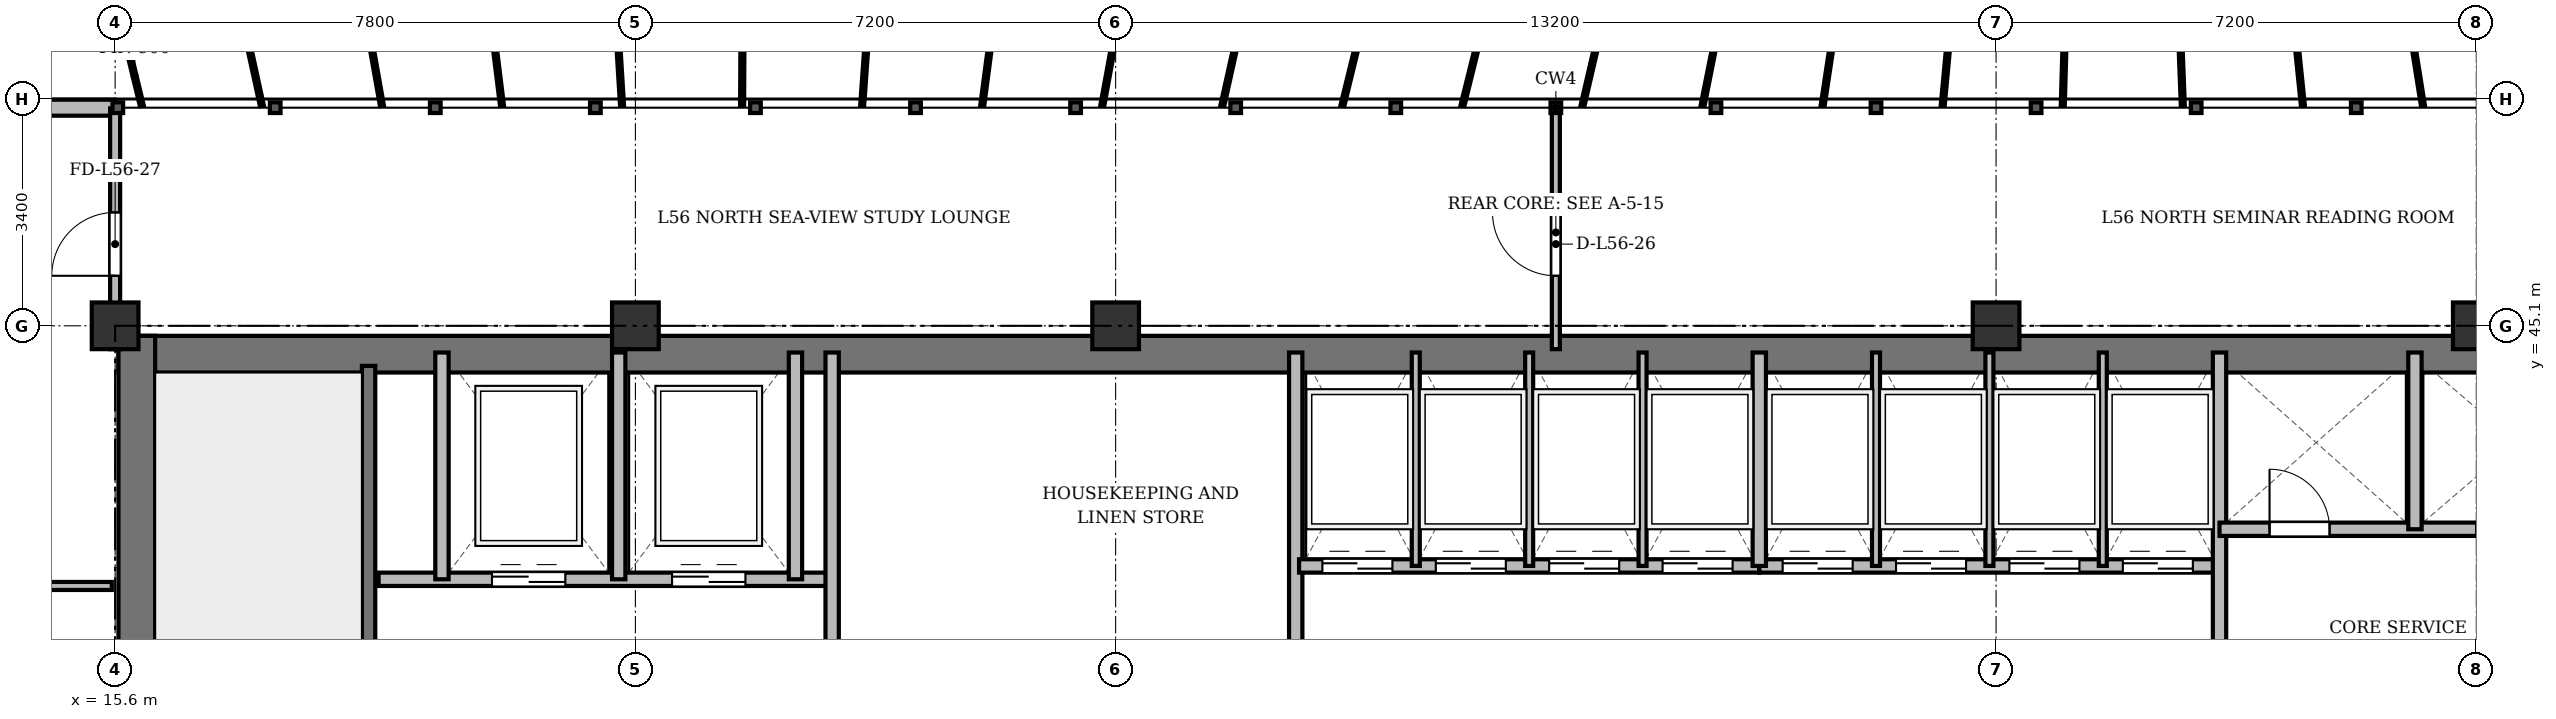
"""IFC4 building model, lengths in metres.
Left out: names, types, materials, properties, quantities, classifications, styles, units other than length and angle.
Written with IfcOpenShell. Run it as: python <this file> out.ifc"""

import sys

from ifc_helpers import new_model, si_unit, direction, frame, frame_2d, origin, origin_2d, place, context, subcontext, project, spatial, rectangle, extrude, source, transform, mapped, element, fill, save


model = new_model("IFC4")
c1 = context("Model", 3, precision=1e-05, world=origin(), true_north=direction((0.0, 1.0)))
c2 = subcontext(c1, "Body", "Model", "MODEL_VIEW")
j1 = project(units=[si_unit("LENGTHUNIT", "METRE"), si_unit("PLANEANGLEUNIT", "RADIAN")], contexts=[c1])
p1 = place(None, origin())
s1 = spatial("IfcSite", under=j1, at=p1, CompositionType="ELEMENT")
p2 = place(p1, origin())
s2 = spatial("IfcBuilding", under=s1, at=p2, CompositionType="ELEMENT")
p3 = place(p2, frame((0.0, 0.0, 215.7)))
s3 = spatial("IfcBuildingStorey", under=s2, at=p3, CompositionType="ELEMENT", Elevation=215.7)
m1 = source(origin(), c2, "Body", "SweptSolid", [
    extrude(rectangle(XDim=0.7, YDim=0.7, at=origin_2d()), origin(), (0.0, 0.0, 1.0), 3.6),
])
for number, where, z_axis, x_axis in (
    (1, (15.6, 45.1, 0.0), (0.0, 0.0, 1.0), (1.0, 0.0, 0.0)),
    (2, (23.4, 45.1, 0.0), (0.0, 0.0, 1.0), (1.0, 0.0, 0.0)),
    (3, (30.6, 45.1, 0.0), (0.0, 0.0, 1.0), (1.0, 0.0, 0.0)),
    (4, (43.8, 45.1, 0.0), (0.0, 0.0, 1.0), (1.0, 0.0, 0.0)),
    (5, (51.0, 45.1, 0.0), (0.0, 0.0, 1.0), (1.0, 0.0, 0.0)),
):
    element("IfcColumn", number, at=place(p3, frame(where, z_axis=z_axis, x_axis=x_axis)), inside=s3, PredefinedType="COLUMN", context=c2, shape_type="MappedRepresentation", body=[
        mapped(m1, transform((0.0, 0.0, 0.0), x_axis=(1.0, 0.0, 0.0), y_axis=(0.0, 1.0, 0.0), z_axis=(0.0, 0.0, 1.0), scale=1.0)),
    ])
p4 = place(p3, frame((11.1, 48.37, 0.0), z_axis=(0.0, 0.0, 1.0), x_axis=(1.0, 0.0, 0.0)))
e6 = element("IfcWall", 6, at=p4, inside=s3, PredefinedType="SOLIDWALL", context=c2, shape_type="SweptSolid", body=[
    extrude(rectangle(XDim=4.5, YDim=0.24, at=frame_2d((2.25, 0.0))), origin(), (0.0, 0.0, 1.0), 3.36),
])
p5 = place(p4, frame((1.65, 0.0, 0.9)))
e7 = element("IfcOpeningElement", 7, at=p5, cuts=e6, PredefinedType="OPENING", context=c2, shape_type="SweptSolid", body=[
    extrude(rectangle(XDim=1.2, YDim=1.65, at=frame_2d((0.6, 0.825))), frame((0.0, 0.13, 0.0), z_axis=(0.0, -1.0, 0.0), x_axis=(1.0, 0.0, 0.0)), (0.0, 0.0, 1.0), 0.26),
])
p6 = place(p3, frame((15.65, 44.675, 0.0), z_axis=(0.0, 0.0, 1.0), x_axis=(1.0, 0.0, 0.0)))
e8 = element("IfcWall", 8, at=p6, inside=s3, PredefinedType="SHEAR", context=c2, shape_type="SweptSolid", body=[
    extrude(rectangle(XDim=43.1, YDim=0.55, at=frame_2d((21.55, 0.0))), origin(), (0.0, 0.0, 1.0), 3.36),
])
p7 = place(p3, frame((15.925, 33.4, 0.0), z_axis=(0.0, 0.0, 1.0), x_axis=(0.0, 1.0, 0.0)))
e9 = element("IfcWall", 9, at=p7, inside=s3, PredefinedType="SHEAR", context=c2, shape_type="SweptSolid", body=[
    extrude(rectangle(XDim=11.55, YDim=0.55, at=frame_2d((5.775, 0.0))), origin(), (0.0, 0.0, 1.0), 3.36),
])
p8 = place(p3, frame((19.4, 33.4, 0.0), z_axis=(0.0, 0.0, 1.0), x_axis=(0.0, 1.0, 0.0)))
e10 = element("IfcWall", 10, at=p8, inside=s3, PredefinedType="SHEAR", context=c2, shape_type="SweptSolid", body=[
    extrude(rectangle(XDim=11.1, YDim=0.2, at=frame_2d((5.55, 0.0))), origin(), (0.0, 0.0, 1.0), 3.36),
])
p9 = place(p8, frame((0.85, 0.0, 0.0)))
e11 = element("IfcOpeningElement", 11, at=p9, cuts=e10, PredefinedType="OPENING", context=c2, shape_type="SweptSolid", body=[
    extrude(rectangle(XDim=1.1, YDim=2.15, at=frame_2d((0.55, 1.075))), frame((0.0, 0.11, 0.0), z_axis=(0.0, -1.0, 0.0), x_axis=(1.0, 0.0, 0.0)), (0.0, 0.0, 1.0), 0.22),
])
p10 = place(p3, frame((19.55, 41.3, 0.0), z_axis=(0.0, 0.0, 1.0), x_axis=(1.0, 0.0, 0.0)))
e12 = element("IfcWall", 12, at=p10, inside=s3, PredefinedType="SOLIDWALL", context=c2, shape_type="SweptSolid", body=[
    extrude(rectangle(XDim=6.75, YDim=0.2, at=frame_2d((3.375, 0.0))), origin(), (0.0, 0.0, 1.0), 3.36),
])
p11 = place(p10, frame((1.7, 0.0, 0.0)))
e13 = element("IfcOpeningElement", 13, at=p11, cuts=e12, PredefinedType="OPENING", context=c2, shape_type="SweptSolid", body=[
    extrude(rectangle(XDim=1.1, YDim=2.15, at=frame_2d((0.55, 1.075))), frame((0.0, 0.11, 0.0), z_axis=(0.0, -1.0, 0.0), x_axis=(1.0, 0.0, 0.0)), (0.0, 0.0, 1.0), 0.22),
])
p12 = place(p10, frame((4.4, 0.0, 0.0)))
e14 = element("IfcOpeningElement", 14, at=p12, cuts=e12, PredefinedType="OPENING", context=c2, shape_type="SweptSolid", body=[
    extrude(rectangle(XDim=1.1, YDim=2.15, at=frame_2d((0.55, 1.075))), frame((0.0, 0.11, 0.0), z_axis=(0.0, -1.0, 0.0), x_axis=(1.0, 0.0, 0.0)), (0.0, 0.0, 1.0), 0.22),
])
for number, where, z_axis, x_axis in (
    (15, (20.5, 41.3, 0.0), (0.0, 0.0, 1.0), (0.0, 1.0, 0.0)),
    (16, (23.15, 41.3, 0.0), (0.0, 0.0, 1.0), (0.0, 1.0, 0.0)),
    (17, (25.8, 41.3, 0.0), (0.0, 0.0, 1.0), (0.0, 1.0, 0.0)),
):
    element("IfcWall", number, at=place(p3, frame(where, z_axis=z_axis, x_axis=x_axis)), inside=s3, PredefinedType="SOLIDWALL", context=c2, shape_type="SweptSolid", body=[
        extrude(rectangle(XDim=3.4, YDim=0.2, at=frame_2d((1.7, 0.0))), origin(), (0.0, 0.0, 1.0), 3.36),
    ])
for number, where, z_axis, x_axis in (
    (18, (26.35, 33.4, 0.0), (0.0, 0.0, 1.0), (0.0, 1.0, 0.0)),
    (19, (33.3, 33.4, 0.0), (0.0, 0.0, 1.0), (0.0, 1.0, 0.0)),
):
    element("IfcWall", number, at=place(p3, frame(where, z_axis=z_axis, x_axis=x_axis)), inside=s3, PredefinedType="SOLIDWALL", context=c2, shape_type="SweptSolid", body=[
        extrude(rectangle(XDim=11.3, YDim=0.2, at=frame_2d((5.65, 0.0))), origin(), (0.0, 0.0, 1.0), 2.91),
    ])
p13 = place(p3, frame((33.35, 41.5, 0.0), z_axis=(0.0, 0.0, 1.0), x_axis=(1.0, 0.0, 0.0)))
e20 = element("IfcWall", 20, at=p13, inside=s3, PredefinedType="SOLIDWALL", context=c2, shape_type="SweptSolid", body=[
    extrude(rectangle(XDim=6.9, YDim=0.2, at=frame_2d((3.45, 0.0))), origin(), (0.0, 0.0, 1.0), 3.36),
])
p14 = place(p13, frame((0.35, 0.0, 0.0)))
e21 = element("IfcOpeningElement", 21, at=p14, cuts=e20, PredefinedType="OPENING", context=c2, shape_type="SweptSolid", body=[
    extrude(rectangle(XDim=1.05, YDim=2.15, at=frame_2d((0.525, 1.075))), frame((0.0, 0.11, 0.0), z_axis=(0.0, -1.0, 0.0), x_axis=(1.0, 0.0, 0.0)), (0.0, 0.0, 1.0), 0.22),
])
p15 = place(p13, frame((2.05, 0.0, 0.0)))
e22 = element("IfcOpeningElement", 22, at=p15, cuts=e20, PredefinedType="OPENING", context=c2, shape_type="SweptSolid", body=[
    extrude(rectangle(XDim=1.05, YDim=2.15, at=frame_2d((0.525, 1.075))), frame((0.0, 0.11, 0.0), z_axis=(0.0, -1.0, 0.0), x_axis=(1.0, 0.0, 0.0)), (0.0, 0.0, 1.0), 0.22),
])
p16 = place(p13, frame((3.75, 0.0, 0.0)))
e23 = element("IfcOpeningElement", 23, at=p16, cuts=e20, PredefinedType="OPENING", context=c2, shape_type="SweptSolid", body=[
    extrude(rectangle(XDim=1.05, YDim=2.15, at=frame_2d((0.525, 1.075))), frame((0.0, 0.11, 0.0), z_axis=(0.0, -1.0, 0.0), x_axis=(1.0, 0.0, 0.0)), (0.0, 0.0, 1.0), 0.22),
])
p17 = place(p13, frame((5.45, 0.0, 0.0)))
e24 = element("IfcOpeningElement", 24, at=p17, cuts=e20, PredefinedType="OPENING", context=c2, shape_type="SweptSolid", body=[
    extrude(rectangle(XDim=1.05, YDim=2.15, at=frame_2d((0.525, 1.075))), frame((0.0, 0.11, 0.0), z_axis=(0.0, -1.0, 0.0), x_axis=(1.0, 0.0, 0.0)), (0.0, 0.0, 1.0), 0.22),
])
for number, where, z_axis, x_axis in (
    (25, (35.1, 41.5, 0.0), (0.0, 0.0, 1.0), (0.0, 1.0, 0.0)),
    (26, (36.8, 41.5, 0.0), (0.0, 0.0, 1.0), (0.0, 1.0, 0.0)),
    (27, (38.5, 41.5, 0.0), (0.0, 0.0, 1.0), (0.0, 1.0, 0.0)),
):
    element("IfcWall", number, at=place(p3, frame(where, z_axis=z_axis, x_axis=x_axis)), inside=s3, PredefinedType="PARTITIONING", context=c2, shape_type="SweptSolid", body=[
        extrude(rectangle(XDim=3.2, YDim=0.12, at=frame_2d((1.6, 0.0))), origin(), (0.0, 0.0, 1.0), 3.36),
    ])
p18 = place(p3, frame((40.25, 41.5, 0.0), z_axis=(0.0, 0.0, 1.0), x_axis=(1.0, 0.0, 0.0)))
e28 = element("IfcWall", 28, at=p18, inside=s3, PredefinedType="SOLIDWALL", context=c2, shape_type="SweptSolid", body=[
    extrude(rectangle(XDim=6.9, YDim=0.2, at=frame_2d((3.45, 0.0))), origin(), (0.0, 0.0, 1.0), 3.36),
])
p19 = place(p18, frame((0.35, 0.0, 0.0)))
e29 = element("IfcOpeningElement", 29, at=p19, cuts=e28, PredefinedType="OPENING", context=c2, shape_type="SweptSolid", body=[
    extrude(rectangle(XDim=1.05, YDim=2.15, at=frame_2d((0.525, 1.075))), frame((0.0, 0.11, 0.0), z_axis=(0.0, -1.0, 0.0), x_axis=(1.0, 0.0, 0.0)), (0.0, 0.0, 1.0), 0.22),
])
p20 = place(p18, frame((2.05, 0.0, 0.0)))
e30 = element("IfcOpeningElement", 30, at=p20, cuts=e28, PredefinedType="OPENING", context=c2, shape_type="SweptSolid", body=[
    extrude(rectangle(XDim=1.05, YDim=2.15, at=frame_2d((0.525, 1.075))), frame((0.0, 0.11, 0.0), z_axis=(0.0, -1.0, 0.0), x_axis=(1.0, 0.0, 0.0)), (0.0, 0.0, 1.0), 0.22),
])
p21 = place(p18, frame((3.75, 0.0, 0.0)))
e31 = element("IfcOpeningElement", 31, at=p21, cuts=e28, PredefinedType="OPENING", context=c2, shape_type="SweptSolid", body=[
    extrude(rectangle(XDim=1.05, YDim=2.15, at=frame_2d((0.525, 1.075))), frame((0.0, 0.11, 0.0), z_axis=(0.0, -1.0, 0.0), x_axis=(1.0, 0.0, 0.0)), (0.0, 0.0, 1.0), 0.22),
])
p22 = place(p18, frame((5.45, 0.0, 0.0)))
e32 = element("IfcOpeningElement", 32, at=p22, cuts=e28, PredefinedType="OPENING", context=c2, shape_type="SweptSolid", body=[
    extrude(rectangle(XDim=1.05, YDim=2.15, at=frame_2d((0.525, 1.075))), frame((0.0, 0.11, 0.0), z_axis=(0.0, -1.0, 0.0), x_axis=(1.0, 0.0, 0.0)), (0.0, 0.0, 1.0), 0.22),
])
p23 = place(p3, frame((40.25, 41.5, 0.0), z_axis=(0.0, 0.0, 1.0), x_axis=(0.0, 1.0, 0.0)))
e33 = element("IfcWall", 33, at=p23, inside=s3, PredefinedType="SOLIDWALL", context=c2, shape_type="SweptSolid", body=[
    extrude(rectangle(XDim=3.2, YDim=0.2, at=frame_2d((1.6, 0.0))), origin(), (0.0, 0.0, 1.0), 3.36),
])
for number, where, z_axis, x_axis in (
    (34, (42.0, 41.5, 0.0), (0.0, 0.0, 1.0), (0.0, 1.0, 0.0)),
    (35, (43.7, 41.5, 0.0), (0.0, 0.0, 1.0), (0.0, 1.0, 0.0)),
    (36, (45.4, 41.5, 0.0), (0.0, 0.0, 1.0), (0.0, 1.0, 0.0)),
):
    element("IfcWall", number, at=place(p3, frame(where, z_axis=z_axis, x_axis=x_axis)), inside=s3, PredefinedType="PARTITIONING", context=c2, shape_type="SweptSolid", body=[
        extrude(rectangle(XDim=3.2, YDim=0.12, at=frame_2d((1.6, 0.0))), origin(), (0.0, 0.0, 1.0), 3.36),
    ])
p24 = place(p3, frame((47.15, 33.4, 0.0), z_axis=(0.0, 0.0, 1.0), x_axis=(0.0, 1.0, 0.0)))
e37 = element("IfcWall", 37, at=p24, inside=s3, PredefinedType="SOLIDWALL", context=c2, shape_type="SweptSolid", body=[
    extrude(rectangle(XDim=11.3, YDim=0.2, at=frame_2d((5.65, 0.0))), origin(), (0.0, 0.0, 1.0), 2.91),
])
p25 = place(p3, frame((47.15, 42.05, 0.0), z_axis=(0.0, 0.0, 1.0), x_axis=(1.0, 0.0, 0.0)))
e38 = element("IfcWall", 38, at=p25, inside=s3, PredefinedType="SOLIDWALL", context=c2, shape_type="SweptSolid", body=[
    extrude(rectangle(XDim=7.85, YDim=0.2, at=frame_2d((3.925, 0.0))), origin(), (0.0, 0.0, 1.0), 2.86),
])
p26 = place(p25, frame((0.75, 0.0, 0.0)))
e39 = element("IfcOpeningElement", 39, at=p26, cuts=e38, PredefinedType="OPENING", context=c2, shape_type="SweptSolid", body=[
    extrude(rectangle(XDim=0.9, YDim=2.1, at=frame_2d((0.45, 1.05))), frame((0.0, 0.11, 0.0), z_axis=(0.0, -1.0, 0.0), x_axis=(1.0, 0.0, 0.0)), (0.0, 0.0, 1.0), 0.22),
])
p27 = place(p25, frame((3.85, 0.0, 0.0)))
e40 = element("IfcOpeningElement", 40, at=p27, cuts=e38, PredefinedType="OPENING", context=c2, shape_type="SweptSolid", body=[
    extrude(rectangle(XDim=0.9, YDim=2.1, at=frame_2d((0.45, 1.05))), frame((0.0, 0.11, 0.0), z_axis=(0.0, -1.0, 0.0), x_axis=(1.0, 0.0, 0.0)), (0.0, 0.0, 1.0), 0.22),
])
p28 = place(p3, frame((50.08, 42.05, 0.0), z_axis=(0.0, 0.0, 1.0), x_axis=(0.0, 1.0, 0.0)))
e41 = element("IfcWall", 41, at=p28, inside=s3, PredefinedType="SOLIDWALL", context=c2, shape_type="SweptSolid", body=[
    extrude(rectangle(XDim=2.65, YDim=0.2, at=frame_2d((1.325, 0.0))), origin(), (0.0, 0.0, 1.0), 3.36),
])
p29 = place(p3, frame((8.3, 41.2, 0.0), z_axis=(0.0, 0.0, 1.0), x_axis=(1.0, 0.0, 0.0)))
e42 = element("IfcWall", 42, at=p29, inside=s3, PredefinedType="PARTITIONING", context=c2, shape_type="SweptSolid", body=[
    extrude(rectangle(XDim=7.25, YDim=0.12, at=frame_2d((3.625, 0.0))), origin(), (0.0, 0.0, 1.0), 2.86),
])
p30 = place(p29, frame((3.15, 0.0, 0.0)))
e43 = element("IfcOpeningElement", 43, at=p30, cuts=e42, PredefinedType="OPENING", context=c2, shape_type="SweptSolid", body=[
    extrude(rectangle(XDim=0.95, YDim=2.15, at=frame_2d((0.475, 1.075))), frame((0.0, 0.07, 0.0), z_axis=(0.0, -1.0, 0.0), x_axis=(1.0, 0.0, 0.0)), (0.0, 0.0, 1.0), 0.14),
])
p31 = place(p3, frame((37.2, 44.75, 0.0), z_axis=(0.0, 0.0, 1.0), x_axis=(0.0, 1.0, 0.0)))
e44 = element("IfcWall", 44, at=p31, inside=s3, PredefinedType="PARTITIONING", context=c2, shape_type="SweptSolid", body=[
    extrude(rectangle(XDim=3.61, YDim=0.12, at=frame_2d((1.805, 0.0))), origin(), (0.0, 0.0, 1.0), 2.91),
])
p32 = place(p31, frame((1.1, 0.0, 0.0)))
e45 = element("IfcOpeningElement", 45, at=p32, cuts=e44, PredefinedType="OPENING", context=c2, shape_type="SweptSolid", body=[
    extrude(rectangle(XDim=0.95, YDim=2.15, at=frame_2d((0.475, 1.075))), frame((0.0, 0.07, 0.0), z_axis=(0.0, -1.0, 0.0), x_axis=(1.0, 0.0, 0.0)), (0.0, 0.0, 1.0), 0.14),
])
p33 = place(p3, frame((15.6, 44.75, 0.0), z_axis=(0.0, 0.0, 1.0), x_axis=(0.0, 1.0, 0.0)))
e46 = element("IfcWall", 46, at=p33, inside=s3, PredefinedType="PARTITIONING", context=c2, shape_type="SweptSolid", body=[
    extrude(rectangle(XDim=3.61, YDim=0.15, at=frame_2d((1.805, 0.0))), origin(), (0.0, 0.0, 1.0), 2.86),
])
p34 = place(p33, frame((1.1, 0.0, 0.0)))
e47 = element("IfcOpeningElement", 47, at=p34, cuts=e46, PredefinedType="OPENING", context=c2, shape_type="SweptSolid", body=[
    extrude(rectangle(XDim=0.95, YDim=2.15, at=frame_2d((0.475, 1.075))), frame((0.0, 0.085, 0.0), z_axis=(0.0, -1.0, 0.0), x_axis=(1.0, 0.0, 0.0)), (0.0, 0.0, 1.0), 0.17),
])
m2 = source(origin(), c2, "Body", "SweptSolid", [
    extrude(rectangle(XDim=1.1, YDim=2.15, at=frame_2d((0.55, 1.075))), frame((0.0, 0.025, 0.0), z_axis=(0.0, -1.0, 0.0), x_axis=(1.0, 0.0, 0.0)), (0.0, 0.0, 1.0), 0.05),
])
p35 = place(p11, origin())
e48 = element("IfcDoor", 48, at=p35, inside=s3, OperationType="DOUBLE_DOOR_SLIDING", PredefinedType="DOOR", context=c2, shape_type="MappedRepresentation", body=[
    mapped(m2, transform((0.0, 0.0, 0.0), x_axis=(1.0, 0.0, 0.0), y_axis=(0.0, 1.0, 0.0), z_axis=(0.0, 0.0, 1.0), scale=1.0)),
])
fill(e13, e48)
p36 = place(p12, origin())
e49 = element("IfcDoor", 49, at=p36, inside=s3, OperationType="DOUBLE_DOOR_SLIDING", PredefinedType="DOOR", context=c2, shape_type="MappedRepresentation", body=[
    mapped(m2, transform((0.0, 0.0, 0.0), x_axis=(1.0, 0.0, 0.0), y_axis=(0.0, 1.0, 0.0), z_axis=(0.0, 0.0, 1.0), scale=1.0)),
])
fill(e14, e49)
m3 = source(origin(), c2, "Body", "SweptSolid", [
    extrude(rectangle(XDim=1.05, YDim=2.15, at=frame_2d((0.525, 1.075))), frame((0.0, 0.025, 0.0), z_axis=(0.0, -1.0, 0.0), x_axis=(1.0, 0.0, 0.0)), (0.0, 0.0, 1.0), 0.05),
])
p37 = place(p14, origin())
e50 = element("IfcDoor", 50, at=p37, inside=s3, OperationType="DOUBLE_DOOR_SLIDING", PredefinedType="DOOR", context=c2, shape_type="MappedRepresentation", body=[
    mapped(m3, transform((0.0, 0.0, 0.0), x_axis=(1.0, 0.0, 0.0), y_axis=(0.0, 1.0, 0.0), z_axis=(0.0, 0.0, 1.0), scale=1.0)),
])
fill(e21, e50)
p38 = place(p15, origin())
e51 = element("IfcDoor", 51, at=p38, inside=s3, OperationType="DOUBLE_DOOR_SLIDING", PredefinedType="DOOR", context=c2, shape_type="MappedRepresentation", body=[
    mapped(m3, transform((0.0, 0.0, 0.0), x_axis=(1.0, 0.0, 0.0), y_axis=(0.0, 1.0, 0.0), z_axis=(0.0, 0.0, 1.0), scale=1.0)),
])
fill(e22, e51)
p39 = place(p16, origin())
e52 = element("IfcDoor", 52, at=p39, inside=s3, OperationType="DOUBLE_DOOR_SLIDING", PredefinedType="DOOR", context=c2, shape_type="MappedRepresentation", body=[
    mapped(m3, transform((0.0, 0.0, 0.0), x_axis=(1.0, 0.0, 0.0), y_axis=(0.0, 1.0, 0.0), z_axis=(0.0, 0.0, 1.0), scale=1.0)),
])
fill(e23, e52)
p40 = place(p17, origin())
e53 = element("IfcDoor", 53, at=p40, inside=s3, OperationType="DOUBLE_DOOR_SLIDING", PredefinedType="DOOR", context=c2, shape_type="MappedRepresentation", body=[
    mapped(m3, transform((0.0, 0.0, 0.0), x_axis=(1.0, 0.0, 0.0), y_axis=(0.0, 1.0, 0.0), z_axis=(0.0, 0.0, 1.0), scale=1.0)),
])
fill(e24, e53)
p41 = place(p19, origin())
e54 = element("IfcDoor", 54, at=p41, inside=s3, OperationType="DOUBLE_DOOR_SLIDING", PredefinedType="DOOR", context=c2, shape_type="MappedRepresentation", body=[
    mapped(m3, transform((0.0, 0.0, 0.0), x_axis=(1.0, 0.0, 0.0), y_axis=(0.0, 1.0, 0.0), z_axis=(0.0, 0.0, 1.0), scale=1.0)),
])
fill(e29, e54)
p42 = place(p20, origin())
e55 = element("IfcDoor", 55, at=p42, inside=s3, OperationType="DOUBLE_DOOR_SLIDING", PredefinedType="DOOR", context=c2, shape_type="MappedRepresentation", body=[
    mapped(m3, transform((0.0, 0.0, 0.0), x_axis=(1.0, 0.0, 0.0), y_axis=(0.0, 1.0, 0.0), z_axis=(0.0, 0.0, 1.0), scale=1.0)),
])
fill(e30, e55)
p43 = place(p21, origin())
e56 = element("IfcDoor", 56, at=p43, inside=s3, OperationType="DOUBLE_DOOR_SLIDING", PredefinedType="DOOR", context=c2, shape_type="MappedRepresentation", body=[
    mapped(m3, transform((0.0, 0.0, 0.0), x_axis=(1.0, 0.0, 0.0), y_axis=(0.0, 1.0, 0.0), z_axis=(0.0, 0.0, 1.0), scale=1.0)),
])
fill(e31, e56)
p44 = place(p22, origin())
e57 = element("IfcDoor", 57, at=p44, inside=s3, OperationType="DOUBLE_DOOR_SLIDING", PredefinedType="DOOR", context=c2, shape_type="MappedRepresentation", body=[
    mapped(m3, transform((0.0, 0.0, 0.0), x_axis=(1.0, 0.0, 0.0), y_axis=(0.0, 1.0, 0.0), z_axis=(0.0, 0.0, 1.0), scale=1.0)),
])
fill(e32, e57)
m4 = source(origin(), c2, "Body", "SweptSolid", [
    extrude(rectangle(XDim=0.9, YDim=2.1, at=frame_2d((0.45, 1.05))), frame((0.0, 0.025, 0.0), z_axis=(0.0, -1.0, 0.0), x_axis=(1.0, 0.0, 0.0)), (0.0, 0.0, 1.0), 0.05),
])
p45 = place(p26, origin())
e58 = element("IfcDoor", 58, at=p45, inside=s3, OperationType="SINGLE_SWING_LEFT", PredefinedType="DOOR", context=c2, shape_type="MappedRepresentation", body=[
    mapped(m4, transform((0.0, 0.0, 0.0), x_axis=(1.0, 0.0, 0.0), y_axis=(0.0, 1.0, 0.0), z_axis=(0.0, 0.0, 1.0), scale=1.0)),
])
fill(e39, e58)
m5 = source(origin(), c2, "Body", "SweptSolid", [
    extrude(rectangle(XDim=0.95, YDim=2.15, at=frame_2d((0.475, 1.075))), frame((0.0, 0.025, 0.0), z_axis=(0.0, -1.0, 0.0), x_axis=(1.0, 0.0, 0.0)), (0.0, 0.0, 1.0), 0.05),
])
p46 = place(p32, origin())
e59 = element("IfcDoor", 59, at=p46, inside=s3, OperationType="SINGLE_SWING_RIGHT", PredefinedType="DOOR", context=c2, shape_type="MappedRepresentation", body=[
    mapped(m5, transform((0.0, 0.0, 0.0), x_axis=(1.0, 0.0, 0.0), y_axis=(0.0, 1.0, 0.0), z_axis=(0.0, 0.0, 1.0), scale=1.0)),
])
fill(e45, e59)
p47 = place(p34, origin())
e60 = element("IfcDoor", 60, at=p47, inside=s3, OperationType="SINGLE_SWING_LEFT", PredefinedType="DOOR", context=c2, shape_type="MappedRepresentation", body=[
    mapped(m5, transform((0.0, 0.0, 0.0), x_axis=(1.0, 0.0, 0.0), y_axis=(0.0, 1.0, 0.0), z_axis=(0.0, 0.0, 1.0), scale=1.0)),
])
fill(e47, e60)
save(model, sys.argv[1])
